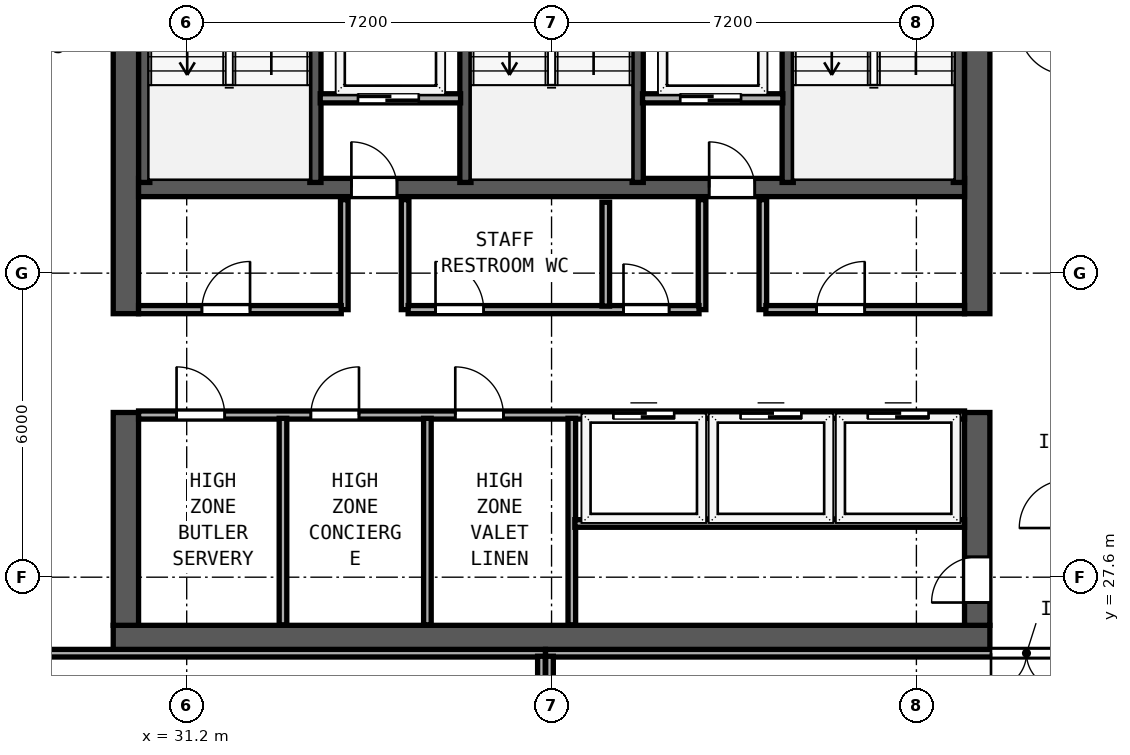
"""IFC4 building model, lengths in metres.
Left out: names, types, materials, properties, quantities, classifications, styles, units other than length and angle.
Written with IfcOpenShell. Run it as: python <this file> out.ifc"""

import sys

from ifc_helpers import new_model, si_unit, direction, frame, frame_2d, origin, place, context, subcontext, project, spatial, rectangle, extrude, element, fill, save


model = new_model("IFC4")
c1 = context("Model", 3, precision=1e-05, world=origin(), true_north=direction((0.0, 1.0)))
c2 = subcontext(c1, "Body", "Model", "MODEL_VIEW")
j1 = project(units=[si_unit("LENGTHUNIT", "METRE"), si_unit("PLANEANGLEUNIT", "RADIAN")], contexts=[c1])
p1 = place(None, origin())
s1 = spatial("IfcSite", under=j1, at=p1, CompositionType="ELEMENT")
p2 = place(p1, origin())
s2 = spatial("IfcBuilding", under=s1, at=p2, CompositionType="ELEMENT")
p3 = place(p2, frame((0.0, 0.0, 323.2)))
s3 = spatial("IfcBuildingStorey", under=s2, at=p3, CompositionType="ELEMENT", Elevation=323.2)
p4 = place(p3, frame((29.75, 26.4, 0.0), z_axis=(0.0, 0.0, 1.0), x_axis=(1.0, 0.0, 0.0)))
e1 = element("IfcWall", 1, at=p4, inside=s3, PredefinedType="SHEAR", context=c2, shape_type="SweptSolid", body=[
    extrude(rectangle(XDim=17.3, YDim=0.5, at=frame_2d((8.65, 0.0))), origin(), (0.0, 0.0, 1.0), 4.75),
])
p5 = place(p3, frame((30.0, 26.65, 0.0), z_axis=(0.0, 0.0, 1.0), x_axis=(0.0, 1.0, 0.0)))
e2 = element("IfcWall", 2, at=p5, inside=s3, PredefinedType="SHEAR", context=c2, shape_type="SweptSolid", body=[
    extrude(rectangle(XDim=4.2, YDim=0.5, at=frame_2d((2.1, 0.0))), origin(), (0.0, 0.0, 1.0), 4.75),
])
p6 = place(p3, frame((30.0, 32.8, 0.0), z_axis=(0.0, 0.0, 1.0), x_axis=(0.0, 1.0, 0.0)))
e3 = element("IfcWall", 3, at=p6, inside=s3, PredefinedType="SHEAR", context=c2, shape_type="SweptSolid", body=[
    extrude(rectangle(XDim=10.15, YDim=0.5, at=frame_2d((5.075, 0.0))), origin(), (0.0, 0.0, 1.0), 4.75),
])
p7 = place(p3, frame((46.8, 26.65, 0.0), z_axis=(0.0, 0.0, 1.0), x_axis=(0.0, 1.0, 0.0)))
e4 = element("IfcWall", 4, at=p7, inside=s3, PredefinedType="SHEAR", context=c2, shape_type="SweptSolid", body=[
    extrude(rectangle(XDim=4.2, YDim=0.5, at=frame_2d((2.1, 0.0))), origin(), (0.0, 0.0, 1.0), 4.75),
])
p8 = place(p7, frame((1.35, 0.0, 0.0), z_axis=(0.0, 0.0, 1.0), x_axis=(-1.0, 0.0, 0.0)))
e5 = element("IfcOpeningElement", 5, at=p8, cuts=e4, PredefinedType="OPENING", context=c2, shape_type="SweptSolid", body=[
    extrude(rectangle(XDim=0.9, YDim=2.1, at=frame_2d((0.45, 1.05))), frame((0.0, 0.26, 0.0), z_axis=(0.0, -1.0, 0.0), x_axis=(1.0, 0.0, 0.0)), (0.0, 0.0, 1.0), 0.52),
])
p9 = place(p3, frame((46.8, 32.8, 0.0), z_axis=(0.0, 0.0, 1.0), x_axis=(0.0, 1.0, 0.0)))
e6 = element("IfcWall", 6, at=p9, inside=s3, PredefinedType="SHEAR", context=c2, shape_type="SweptSolid", body=[
    extrude(rectangle(XDim=10.15, YDim=0.5, at=frame_2d((5.075, 0.0))), origin(), (0.0, 0.0, 1.0), 4.75),
])
p10 = place(p3, frame((30.25, 35.29, 0.0), z_axis=(0.0, 0.0, 1.0), x_axis=(1.0, 0.0, 0.0)))
e7 = element("IfcWall", 7, at=p10, inside=s3, PredefinedType="SHEAR", context=c2, shape_type="SweptSolid", body=[
    extrude(rectangle(XDim=16.3, YDim=0.36, at=frame_2d((8.15, 0.0))), origin(), (0.0, 0.0, 1.0), 4.75),
])
p11 = place(p10, frame((5.1, 0.0, 0.0), z_axis=(0.0, 0.0, 1.0), x_axis=(-1.0, 0.0, 0.0)))
e8 = element("IfcOpeningElement", 8, at=p11, cuts=e7, PredefinedType="OPENING", context=c2, shape_type="SweptSolid", body=[
    extrude(rectangle(XDim=0.9, YDim=2.1, at=frame_2d((0.45, 1.05))), frame((0.0, 0.19, 0.0), z_axis=(0.0, -1.0, 0.0), x_axis=(1.0, 0.0, 0.0)), (0.0, 0.0, 1.0), 0.38),
])
p12 = place(p10, frame((12.16, 0.0, 0.0), z_axis=(0.0, 0.0, 1.0), x_axis=(-1.0, 0.0, 0.0)))
e9 = element("IfcOpeningElement", 9, at=p12, cuts=e7, PredefinedType="OPENING", context=c2, shape_type="SweptSolid", body=[
    extrude(rectangle(XDim=0.9, YDim=2.1, at=frame_2d((0.45, 1.05))), frame((0.0, 0.19, 0.0), z_axis=(0.0, -1.0, 0.0), x_axis=(1.0, 0.0, 0.0)), (0.0, 0.0, 1.0), 0.38),
])
for number, where, z_axis, x_axis in (
    (10, (30.362, 35.39, 0.0), (0.0, 0.0, 1.0), (0.0, 1.0, 0.0)),
    (11, (33.74, 35.39, 0.0), (0.0, 0.0, 1.0), (0.0, 1.0, 0.0)),
    (12, (36.7, 35.39, 0.0), (0.0, 0.0, 1.0), (0.0, 1.0, 0.0)),
    (13, (40.1, 35.39, 0.0), (0.0, 0.0, 1.0), (0.0, 1.0, 0.0)),
    (14, (43.06, 35.39, 0.0), (0.0, 0.0, 1.0), (0.0, 1.0, 0.0)),
    (15, (46.438, 35.39, 0.0), (0.0, 0.0, 1.0), (0.0, 1.0, 0.0)),
):
    element("IfcWall", number, at=place(p3, frame(where, z_axis=z_axis, x_axis=x_axis)), inside=s3, PredefinedType="SHEAR", context=c2, shape_type="SweptSolid", body=[
        extrude(rectangle(XDim=7.56, YDim=0.22, at=frame_2d((3.78, 0.0))), origin(), (0.0, 0.0, 1.0), 4.75),
    ])
p13 = place(p3, frame((33.835, 37.05, 0.0), z_axis=(0.0, 0.0, 1.0), x_axis=(1.0, 0.0, 0.0)))
e16 = element("IfcWall", 16, at=p13, inside=s3, PredefinedType="SOLIDWALL", context=c2, shape_type="SweptSolid", body=[
    extrude(rectangle(XDim=2.77, YDim=0.18, at=frame_2d((1.385, 0.0))), origin(), (0.0, 0.0, 1.0), 4.75),
])
p14 = place(p13, frame((1.945, 0.0, 0.0), z_axis=(0.0, 0.0, 1.0), x_axis=(-1.0, 0.0, 0.0)))
e17 = element("IfcOpeningElement", 17, at=p14, cuts=e16, PredefinedType="OPENING", context=c2, shape_type="SweptSolid", body=[
    extrude(rectangle(XDim=1.2, YDim=2.2, at=frame_2d((0.6, 1.1))), frame((0.0, 0.1, 0.0), z_axis=(0.0, -1.0, 0.0), x_axis=(1.0, 0.0, 0.0)), (0.0, 0.0, 1.0), 0.2),
])
for number, where, z_axis, x_axis in (
    (18, (34.31, 32.88, 0.0), (0.0, 0.0, 1.0), (0.0, 1.0, 0.0)),
    (19, (35.51, 32.88, 0.0), (0.0, 0.0, 1.0), (0.0, 1.0, 0.0)),
):
    element("IfcWall", number, at=place(p3, frame(where, z_axis=z_axis, x_axis=x_axis)), inside=s3, PredefinedType="SOLIDWALL", context=c2, shape_type="SweptSolid", body=[
        extrude(rectangle(XDim=2.17, YDim=0.15, at=frame_2d((1.085, 0.0))), origin(), (0.0, 0.0, 1.0), 4.75),
    ])
p15 = place(p3, frame((40.195, 37.05, 0.0), z_axis=(0.0, 0.0, 1.0), x_axis=(1.0, 0.0, 0.0)))
e20 = element("IfcWall", 20, at=p15, inside=s3, PredefinedType="SOLIDWALL", context=c2, shape_type="SweptSolid", body=[
    extrude(rectangle(XDim=2.77, YDim=0.18, at=frame_2d((1.385, 0.0))), origin(), (0.0, 0.0, 1.0), 4.75),
])
p16 = place(p15, frame((1.945, 0.0, 0.0), z_axis=(0.0, 0.0, 1.0), x_axis=(-1.0, 0.0, 0.0)))
e21 = element("IfcOpeningElement", 21, at=p16, cuts=e20, PredefinedType="OPENING", context=c2, shape_type="SweptSolid", body=[
    extrude(rectangle(XDim=1.2, YDim=2.2, at=frame_2d((0.6, 1.1))), frame((0.0, 0.1, 0.0), z_axis=(0.0, -1.0, 0.0), x_axis=(1.0, 0.0, 0.0)), (0.0, 0.0, 1.0), 0.2),
])
for number, where, z_axis, x_axis in (
    (22, (41.37, 32.88, 0.0), (0.0, 0.0, 1.0), (0.0, 1.0, 0.0)),
    (23, (42.57, 32.88, 0.0), (0.0, 0.0, 1.0), (0.0, 1.0, 0.0)),
):
    element("IfcWall", number, at=place(p3, frame(where, z_axis=z_axis, x_axis=x_axis)), inside=s3, PredefinedType="SOLIDWALL", context=c2, shape_type="SweptSolid", body=[
        extrude(rectangle(XDim=2.17, YDim=0.15, at=frame_2d((1.085, 0.0))), origin(), (0.0, 0.0, 1.0), 4.75),
    ])
p17 = place(p3, frame((30.25, 32.88, 0.0), z_axis=(0.0, 0.0, 1.0), x_axis=(1.0, 0.0, 0.0)))
e24 = element("IfcWall", 24, at=p17, inside=s3, PredefinedType="SOLIDWALL", context=c2, shape_type="SweptSolid", body=[
    extrude(rectangle(XDim=4.0, YDim=0.16, at=frame_2d((2.0, 0.0))), origin(), (0.0, 0.0, 1.0), 4.75),
])
p18 = place(p17, frame((2.2, 0.0, 0.0), z_axis=(0.0, 0.0, 1.0), x_axis=(-1.0, 0.0, 0.0)))
e25 = element("IfcOpeningElement", 25, at=p18, cuts=e24, PredefinedType="OPENING", context=c2, shape_type="SweptSolid", body=[
    extrude(rectangle(XDim=0.95, YDim=2.12, at=frame_2d((0.475, 1.06))), frame((0.0, 0.09, 0.0), z_axis=(0.0, -1.0, 0.0), x_axis=(1.0, 0.0, 0.0)), (0.0, 0.0, 1.0), 0.18),
])
p19 = place(p3, frame((35.57, 32.88, 0.0), z_axis=(0.0, 0.0, 1.0), x_axis=(1.0, 0.0, 0.0)))
e26 = element("IfcWall", 26, at=p19, inside=s3, PredefinedType="SOLIDWALL", context=c2, shape_type="SweptSolid", body=[
    extrude(rectangle(XDim=5.74, YDim=0.16, at=frame_2d((2.87, 0.0))), origin(), (0.0, 0.0, 1.0), 4.75),
])
p20 = place(p19, frame((1.49, 0.0, 0.0), z_axis=(0.0, 0.0, 1.0), x_axis=(-1.0, 0.0, 0.0)))
e27 = element("IfcOpeningElement", 27, at=p20, cuts=e26, PredefinedType="OPENING", context=c2, shape_type="SweptSolid", body=[
    extrude(rectangle(XDim=0.95, YDim=2.12, at=frame_2d((0.475, 1.06))), frame((0.0, 0.09, 0.0), z_axis=(0.0, -1.0, 0.0), x_axis=(1.0, 0.0, 0.0)), (0.0, 0.0, 1.0), 0.18),
])
p21 = place(p19, frame((5.15, 0.0, 0.0), z_axis=(0.0, 0.0, 1.0), x_axis=(-1.0, 0.0, 0.0)))
e28 = element("IfcOpeningElement", 28, at=p21, cuts=e26, PredefinedType="OPENING", context=c2, shape_type="SweptSolid", body=[
    extrude(rectangle(XDim=0.9, YDim=2.1, at=frame_2d((0.45, 1.05))), frame((0.0, 0.09, 0.0), z_axis=(0.0, -1.0, 0.0), x_axis=(1.0, 0.0, 0.0)), (0.0, 0.0, 1.0), 0.18),
])
p22 = place(p3, frame((42.63, 32.88, 0.0), z_axis=(0.0, 0.0, 1.0), x_axis=(1.0, 0.0, 0.0)))
e29 = element("IfcWall", 29, at=p22, inside=s3, PredefinedType="SOLIDWALL", context=c2, shape_type="SweptSolid", body=[
    extrude(rectangle(XDim=3.92, YDim=0.16, at=frame_2d((1.96, 0.0))), origin(), (0.0, 0.0, 1.0), 4.75),
])
p23 = place(p22, frame((1.95, 0.0, 0.0), z_axis=(0.0, 0.0, 1.0), x_axis=(-1.0, 0.0, 0.0)))
e30 = element("IfcOpeningElement", 30, at=p23, cuts=e29, PredefinedType="OPENING", context=c2, shape_type="SweptSolid", body=[
    extrude(rectangle(XDim=0.95, YDim=2.12, at=frame_2d((0.475, 1.06))), frame((0.0, 0.09, 0.0), z_axis=(0.0, -1.0, 0.0), x_axis=(1.0, 0.0, 0.0)), (0.0, 0.0, 1.0), 0.18),
])
p24 = place(p3, frame((39.47, 32.95, 0.0), z_axis=(0.0, 0.0, 1.0), x_axis=(0.0, 1.0, 0.0)))
e31 = element("IfcWall", 31, at=p24, inside=s3, PredefinedType="SOLIDWALL", context=c2, shape_type="SweptSolid", body=[
    extrude(rectangle(XDim=2.05, YDim=0.15, at=frame_2d((1.025, 0.0))), origin(), (0.0, 0.0, 1.0), 4.75),
])
p25 = place(p3, frame((30.25, 30.8, 0.0), z_axis=(0.0, 0.0, 1.0), x_axis=(1.0, 0.0, 0.0)))
e32 = element("IfcWall", 32, at=p25, inside=s3, PredefinedType="SOLIDWALL", context=c2, shape_type="SweptSolid", body=[
    extrude(rectangle(XDim=16.3, YDim=0.16, at=frame_2d((8.15, 0.0))), origin(), (0.0, 0.0, 1.0), 4.75),
])
p26 = place(p25, frame((0.75, 0.0, 0.0)))
e33 = element("IfcOpeningElement", 33, at=p26, cuts=e32, PredefinedType="OPENING", context=c2, shape_type="SweptSolid", body=[
    extrude(rectangle(XDim=0.95, YDim=2.12, at=frame_2d((0.475, 1.06))), frame((0.0, 0.09, 0.0), z_axis=(0.0, -1.0, 0.0), x_axis=(1.0, 0.0, 0.0)), (0.0, 0.0, 1.0), 0.18),
])
p27 = place(p25, frame((3.4, 0.0, 0.0)))
e34 = element("IfcOpeningElement", 34, at=p27, cuts=e32, PredefinedType="OPENING", context=c2, shape_type="SweptSolid", body=[
    extrude(rectangle(XDim=0.95, YDim=2.12, at=frame_2d((0.475, 1.06))), frame((0.0, 0.09, 0.0), z_axis=(0.0, -1.0, 0.0), x_axis=(1.0, 0.0, 0.0)), (0.0, 0.0, 1.0), 0.18),
])
p28 = place(p25, frame((6.25, 0.0, 0.0)))
e35 = element("IfcOpeningElement", 35, at=p28, cuts=e32, PredefinedType="OPENING", context=c2, shape_type="SweptSolid", body=[
    extrude(rectangle(XDim=0.95, YDim=2.12, at=frame_2d((0.475, 1.06))), frame((0.0, 0.09, 0.0), z_axis=(0.0, -1.0, 0.0), x_axis=(1.0, 0.0, 0.0)), (0.0, 0.0, 1.0), 0.18),
])
p29 = place(p25, frame((9.37, 0.0, 0.0)))
e36 = element("IfcOpeningElement", 36, at=p29, cuts=e32, PredefinedType="OPENING", context=c2, shape_type="SweptSolid", body=[
    extrude(rectangle(XDim=1.2, YDim=2.2, at=frame_2d((0.6, 1.1))), frame((0.0, 0.09, 0.0), z_axis=(0.0, -1.0, 0.0), x_axis=(1.0, 0.0, 0.0)), (0.0, 0.0, 1.0), 0.18),
])
p30 = place(p25, frame((11.88, 0.0, 0.0)))
e37 = element("IfcOpeningElement", 37, at=p30, cuts=e32, PredefinedType="OPENING", context=c2, shape_type="SweptSolid", body=[
    extrude(rectangle(XDim=1.2, YDim=2.2, at=frame_2d((0.6, 1.1))), frame((0.0, 0.09, 0.0), z_axis=(0.0, -1.0, 0.0), x_axis=(1.0, 0.0, 0.0)), (0.0, 0.0, 1.0), 0.18),
])
p31 = place(p25, frame((14.39, 0.0, 0.0)))
e38 = element("IfcOpeningElement", 38, at=p31, cuts=e32, PredefinedType="OPENING", context=c2, shape_type="SweptSolid", body=[
    extrude(rectangle(XDim=1.2, YDim=2.2, at=frame_2d((0.6, 1.1))), frame((0.0, 0.09, 0.0), z_axis=(0.0, -1.0, 0.0), x_axis=(1.0, 0.0, 0.0)), (0.0, 0.0, 1.0), 0.18),
])
p32 = place(p3, frame((38.8, 26.66, 0.0), z_axis=(0.0, 0.0, 1.0), x_axis=(0.0, 1.0, 0.0)))
e39 = element("IfcWall", 39, at=p32, inside=s3, PredefinedType="SOLIDWALL", context=c2, shape_type="SweptSolid", body=[
    extrude(rectangle(XDim=4.075, YDim=0.15, at=frame_2d((2.038, 0.0))), origin(), (0.0, 0.0, 1.0), 4.75),
])
for number, where, z_axis, x_axis in (
    (40, (33.1, 26.66, 0.0), (0.0, 0.0, 1.0), (0.0, 1.0, 0.0)),
    (41, (35.95, 26.66, 0.0), (0.0, 0.0, 1.0), (0.0, 1.0, 0.0)),
):
    element("IfcWall", number, at=place(p3, frame(where, z_axis=z_axis, x_axis=x_axis)), inside=s3, PredefinedType="PARTITIONING", context=c2, shape_type="SweptSolid", body=[
        extrude(rectangle(XDim=4.075, YDim=0.15, at=frame_2d((2.038, 0.0))), origin(), (0.0, 0.0, 1.0), 4.75),
    ])
p33 = place(p3, frame((38.86, 28.66, 0.0), z_axis=(0.0, 0.0, 1.0), x_axis=(1.0, 0.0, 0.0)))
e42 = element("IfcWall", 42, at=p33, inside=s3, PredefinedType="PARTITIONING", context=c2, shape_type="SweptSolid", body=[
    extrude(rectangle(XDim=7.69, YDim=0.15, at=frame_2d((3.845, 0.0))), origin(), (0.0, 0.0, 1.0), 4.75),
])
for number, where, z_axis, x_axis in (
    (43, (41.47, 28.75, 0.0), (0.0, 0.0, 1.0), (0.0, 1.0, 0.0)),
    (44, (43.98, 28.75, 0.0), (0.0, 0.0, 1.0), (0.0, 1.0, 0.0)),
):
    element("IfcWall", number, at=place(p3, frame(where, z_axis=z_axis, x_axis=x_axis)), inside=s3, PredefinedType="SOLIDWALL", context=c2, shape_type="SweptSolid", body=[
        extrude(rectangle(XDim=1.985, YDim=0.15, at=frame_2d((0.993, 0.0))), origin(), (0.0, 0.0, 1.0), 4.75),
    ])
p34 = place(p3, frame((24.225, 26.1, 0.0), z_axis=(0.0, 0.0, 1.0), x_axis=(1.0, 0.0, 0.0)))
e45 = element("IfcWall", 45, at=p34, inside=s3, PredefinedType="PARTITIONING", context=c2, shape_type="SweptSolid", body=[
    extrude(rectangle(XDim=14.055, YDim=0.15, at=frame_2d((7.027, 0.0))), origin(), (0.0, 0.0, 1.0), 4.75),
])
p35 = place(p34, frame((4.175, 0.0, 0.0), z_axis=(0.0, 0.0, 1.0), x_axis=(-1.0, 0.0, 0.0)))
e46 = element("IfcOpeningElement", 46, at=p35, cuts=e45, PredefinedType="OPENING", context=c2, shape_type="SweptSolid", body=[
    extrude(rectangle(XDim=0.95, YDim=2.12, at=frame_2d((0.475, 1.06))), frame((0.0, 0.085, 0.0), z_axis=(0.0, -1.0, 0.0), x_axis=(1.0, 0.0, 0.0)), (0.0, 0.0, 1.0), 0.17),
])
p36 = place(p3, frame((38.2, 20.612, 0.0), z_axis=(0.0, 0.0, 1.0), x_axis=(0.0, 1.0, 0.0)))
e47 = element("IfcWall", 47, at=p36, inside=s3, PredefinedType="PARTITIONING", context=c2, shape_type="SweptSolid", body=[
    extrude(rectangle(XDim=5.428, YDim=0.15, at=frame_2d((2.714, 0.0))), origin(), (0.0, 0.0, 1.0), 4.035),
])
p37 = place(p3, frame((38.282, 26.1, 0.0), z_axis=(0.0, 0.0, 1.0), x_axis=(1.0, 0.0, 0.0)))
e48 = element("IfcWall", 48, at=p37, inside=s3, PredefinedType="PARTITIONING", context=c2, shape_type="SweptSolid", body=[
    extrude(rectangle(XDim=14.306, YDim=0.15, at=frame_2d((7.153, 0.0))), origin(), (0.0, 0.0, 1.0), 4.75),
])
p38 = place(p37, frame((10.19, 0.0, 0.0), z_axis=(0.0, 0.0, 1.0), x_axis=(-1.0, 0.0, 0.0)))
e49 = element("IfcOpeningElement", 49, at=p38, cuts=e48, PredefinedType="OPENING", context=c2, shape_type="SweptSolid", body=[
    extrude(rectangle(XDim=1.4, YDim=2.18, at=frame_2d((0.7, 1.09))), frame((0.0, 0.085, 0.0), z_axis=(0.0, -1.0, 0.0), x_axis=(1.0, 0.0, 0.0)), (0.0, 0.0, 1.0), 0.17),
])
p39 = place(p3, frame((38.36, 20.612, 0.0), z_axis=(0.0, 0.0, 1.0), x_axis=(0.0, 1.0, 0.0)))
e50 = element("IfcWall", 50, at=p39, inside=s3, PredefinedType="PARTITIONING", context=c2, shape_type="SweptSolid", body=[
    extrude(rectangle(XDim=5.428, YDim=0.15, at=frame_2d((2.714, 0.0))), origin(), (0.0, 0.0, 1.0), 4.035),
])
p40 = place(p14, origin())
e51 = element("IfcDoor", 51, at=p40, inside=s3, OperationType="SLIDING_TO_RIGHT", PredefinedType="DOOR", context=c2, shape_type="SweptSolid", body=[
    extrude(rectangle(XDim=1.2, YDim=2.2, at=frame_2d((0.6, 1.1))), frame((0.0, 0.025, 0.0), z_axis=(0.0, -1.0, 0.0), x_axis=(1.0, 0.0, 0.0)), (0.0, 0.0, 1.0), 0.05),
])
fill(e17, e51)
p41 = place(p11, origin())
e52 = element("IfcDoor", 52, at=p41, inside=s3, OperationType="SINGLE_SWING_RIGHT", PredefinedType="DOOR", context=c2, shape_type="SweptSolid", body=[
    extrude(rectangle(XDim=0.9, YDim=2.1, at=frame_2d((0.45, 1.05))), frame((0.0, 0.025, 0.0), z_axis=(0.0, -1.0, 0.0), x_axis=(1.0, 0.0, 0.0)), (0.0, 0.0, 1.0), 0.05),
])
fill(e8, e52)
p42 = place(p16, origin())
e53 = element("IfcDoor", 53, at=p42, inside=s3, OperationType="SLIDING_TO_RIGHT", PredefinedType="DOOR", context=c2, shape_type="SweptSolid", body=[
    extrude(rectangle(XDim=1.2, YDim=2.2, at=frame_2d((0.6, 1.1))), frame((0.0, 0.025, 0.0), z_axis=(0.0, -1.0, 0.0), x_axis=(1.0, 0.0, 0.0)), (0.0, 0.0, 1.0), 0.05),
])
fill(e21, e53)
p43 = place(p12, origin())
e54 = element("IfcDoor", 54, at=p43, inside=s3, OperationType="SINGLE_SWING_RIGHT", PredefinedType="DOOR", context=c2, shape_type="SweptSolid", body=[
    extrude(rectangle(XDim=0.9, YDim=2.1, at=frame_2d((0.45, 1.05))), frame((0.0, 0.025, 0.0), z_axis=(0.0, -1.0, 0.0), x_axis=(1.0, 0.0, 0.0)), (0.0, 0.0, 1.0), 0.05),
])
fill(e9, e54)
p44 = place(p18, origin())
e55 = element("IfcDoor", 55, at=p44, inside=s3, OperationType="SINGLE_SWING_LEFT", PredefinedType="DOOR", context=c2, shape_type="SweptSolid", body=[
    extrude(rectangle(XDim=0.95, YDim=2.12, at=frame_2d((0.475, 1.06))), frame((0.0, 0.025, 0.0), z_axis=(0.0, -1.0, 0.0), x_axis=(1.0, 0.0, 0.0)), (0.0, 0.0, 1.0), 0.05),
])
fill(e25, e55)
p45 = place(p20, origin())
e56 = element("IfcDoor", 56, at=p45, inside=s3, OperationType="SINGLE_SWING_RIGHT", PredefinedType="DOOR", context=c2, shape_type="SweptSolid", body=[
    extrude(rectangle(XDim=0.95, YDim=2.12, at=frame_2d((0.475, 1.06))), frame((0.0, 0.025, 0.0), z_axis=(0.0, -1.0, 0.0), x_axis=(1.0, 0.0, 0.0)), (0.0, 0.0, 1.0), 0.05),
])
fill(e27, e56)
p46 = place(p21, origin())
e57 = element("IfcDoor", 57, at=p46, inside=s3, OperationType="SINGLE_SWING_RIGHT", PredefinedType="DOOR", context=c2, shape_type="SweptSolid", body=[
    extrude(rectangle(XDim=0.9, YDim=2.1, at=frame_2d((0.45, 1.05))), frame((0.0, 0.025, 0.0), z_axis=(0.0, -1.0, 0.0), x_axis=(1.0, 0.0, 0.0)), (0.0, 0.0, 1.0), 0.05),
])
fill(e28, e57)
p47 = place(p23, origin())
e58 = element("IfcDoor", 58, at=p47, inside=s3, OperationType="SINGLE_SWING_LEFT", PredefinedType="DOOR", context=c2, shape_type="SweptSolid", body=[
    extrude(rectangle(XDim=0.95, YDim=2.12, at=frame_2d((0.475, 1.06))), frame((0.0, 0.025, 0.0), z_axis=(0.0, -1.0, 0.0), x_axis=(1.0, 0.0, 0.0)), (0.0, 0.0, 1.0), 0.05),
])
fill(e30, e58)
p48 = place(p26, origin())
e59 = element("IfcDoor", 59, at=p48, inside=s3, OperationType="SINGLE_SWING_LEFT", PredefinedType="DOOR", context=c2, shape_type="SweptSolid", body=[
    extrude(rectangle(XDim=0.95, YDim=2.12, at=frame_2d((0.475, 1.06))), frame((0.0, 0.025, 0.0), z_axis=(0.0, -1.0, 0.0), x_axis=(1.0, 0.0, 0.0)), (0.0, 0.0, 1.0), 0.05),
])
fill(e33, e59)
p49 = place(p27, origin())
e60 = element("IfcDoor", 60, at=p49, inside=s3, OperationType="SINGLE_SWING_RIGHT", PredefinedType="DOOR", context=c2, shape_type="SweptSolid", body=[
    extrude(rectangle(XDim=0.95, YDim=2.12, at=frame_2d((0.475, 1.06))), frame((0.0, 0.025, 0.0), z_axis=(0.0, -1.0, 0.0), x_axis=(1.0, 0.0, 0.0)), (0.0, 0.0, 1.0), 0.05),
])
fill(e34, e60)
p50 = place(p28, origin())
e61 = element("IfcDoor", 61, at=p50, inside=s3, OperationType="SINGLE_SWING_LEFT", PredefinedType="DOOR", context=c2, shape_type="SweptSolid", body=[
    extrude(rectangle(XDim=0.95, YDim=2.12, at=frame_2d((0.475, 1.06))), frame((0.0, 0.025, 0.0), z_axis=(0.0, -1.0, 0.0), x_axis=(1.0, 0.0, 0.0)), (0.0, 0.0, 1.0), 0.05),
])
fill(e35, e61)
p51 = place(p8, origin())
e62 = element("IfcDoor", 62, at=p51, inside=s3, OperationType="SINGLE_SWING_RIGHT", PredefinedType="DOOR", context=c2, shape_type="SweptSolid", body=[
    extrude(rectangle(XDim=0.9, YDim=2.1, at=frame_2d((0.45, 1.05))), frame((0.0, -0.135, 0.0), z_axis=(0.0, -1.0, 0.0), x_axis=(1.0, 0.0, 0.0)), (0.0, 0.0, 1.0), 0.05),
])
fill(e5, e62)
p52 = place(p29, origin())
e63 = element("IfcDoor", 63, at=p52, inside=s3, OperationType="SLIDING_TO_RIGHT", PredefinedType="DOOR", context=c2, shape_type="SweptSolid", body=[
    extrude(rectangle(XDim=1.2, YDim=2.2, at=frame_2d((0.6, 1.1))), frame((0.0, 0.025, 0.0), z_axis=(0.0, -1.0, 0.0), x_axis=(1.0, 0.0, 0.0)), (0.0, 0.0, 1.0), 0.05),
])
fill(e36, e63)
p53 = place(p30, origin())
e64 = element("IfcDoor", 64, at=p53, inside=s3, OperationType="SLIDING_TO_RIGHT", PredefinedType="DOOR", context=c2, shape_type="SweptSolid", body=[
    extrude(rectangle(XDim=1.2, YDim=2.2, at=frame_2d((0.6, 1.1))), frame((0.0, 0.025, 0.0), z_axis=(0.0, -1.0, 0.0), x_axis=(1.0, 0.0, 0.0)), (0.0, 0.0, 1.0), 0.05),
])
fill(e37, e64)
p54 = place(p31, origin())
e65 = element("IfcDoor", 65, at=p54, inside=s3, OperationType="SLIDING_TO_RIGHT", PredefinedType="DOOR", context=c2, shape_type="SweptSolid", body=[
    extrude(rectangle(XDim=1.2, YDim=2.2, at=frame_2d((0.6, 1.1))), frame((0.0, 0.025, 0.0), z_axis=(0.0, -1.0, 0.0), x_axis=(1.0, 0.0, 0.0)), (0.0, 0.0, 1.0), 0.05),
])
fill(e38, e65)
p55 = place(p38, origin())
e66 = element("IfcDoor", 66, at=p55, inside=s3, OperationType="DOUBLE_DOOR_SINGLE_SWING", PredefinedType="DOOR", context=c2, shape_type="SweptSolid", body=[
    extrude(rectangle(XDim=1.4, YDim=2.18, at=frame_2d((0.7, 1.09))), frame((0.0, 0.025, 0.0), z_axis=(0.0, -1.0, 0.0), x_axis=(1.0, 0.0, 0.0)), (0.0, 0.0, 1.0), 0.05),
])
fill(e49, e66)
save(model, sys.argv[1])
